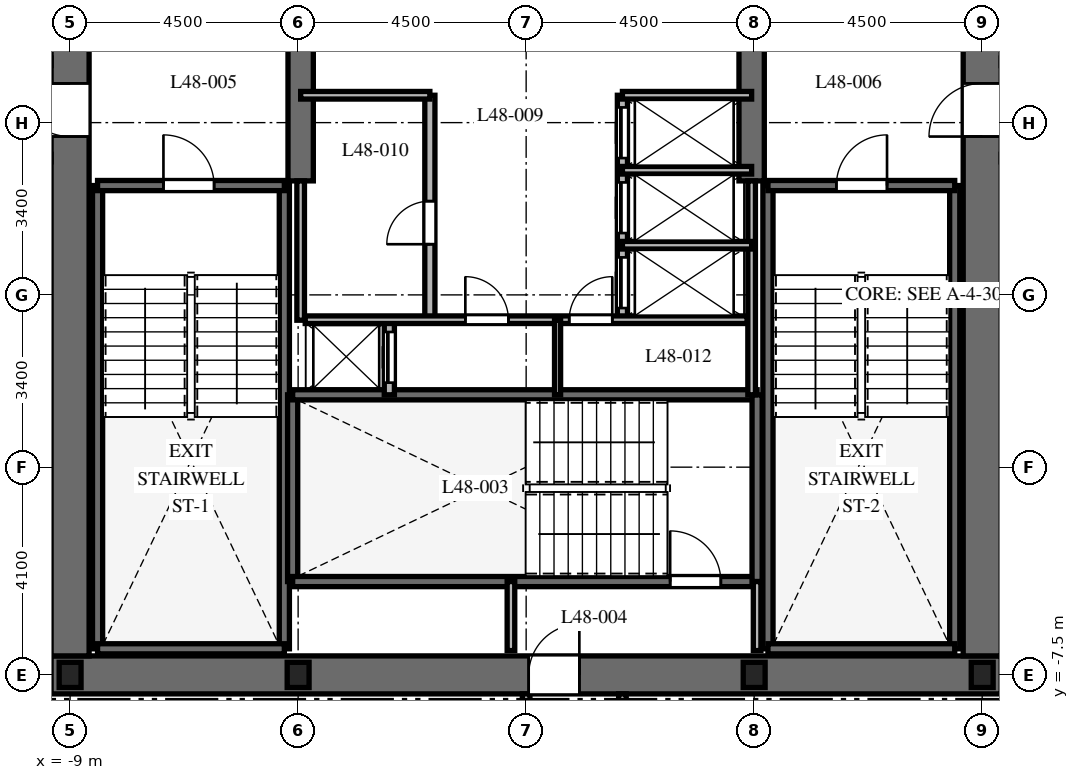
"""IFC4 building model, lengths in metres.
Left out: names, types, materials, properties, quantities, classifications, styles, units other than length and angle.
Written with IfcOpenShell. Run it as: python <this file> out.ifc"""

import sys

from ifc_helpers import new_model, si_unit, direction, frame, frame_2d, origin, origin_2d, place, context, subcontext, project, spatial, rectangle, i_section, extrude, element, fill, save


model = new_model("IFC4")
c1 = context("Model", 3, precision=1e-05, world=origin(), true_north=direction((0.0, 1.0)))
c2 = subcontext(c1, "Body", "Model", "MODEL_VIEW")
j1 = project(units=[si_unit("LENGTHUNIT", "METRE"), si_unit("PLANEANGLEUNIT", "RADIAN")], contexts=[c1])
p1 = place(None, origin())
s1 = spatial("IfcSite", under=j1, at=p1, CompositionType="ELEMENT")
p2 = place(p1, origin())
s2 = spatial("IfcBuilding", under=s1, at=p2, CompositionType="ELEMENT")
p3 = place(p2, frame((0.0, 0.0, 194.1)))
s3 = spatial("IfcBuildingStorey", under=s2, at=p3, CompositionType="ELEMENT", Elevation=194.1)
p4 = place(p3, frame((-9.375, -7.5, 0.0), z_axis=(0.0, 0.0, 1.0), x_axis=(1.0, 0.0, 0.0)))
e1 = element("IfcWall", 1, at=p4, inside=s3, PredefinedType="SHEAR", context=c2, shape_type="SweptSolid", body=[
    extrude(rectangle(XDim=18.75, YDim=0.75, at=frame_2d((9.375, 0.0))), origin(), (0.0, 0.0, 1.0), 3.7),
])
p5 = place(p4, frame((9.425, 0.0, 0.0)))
e2 = element("IfcOpeningElement", 2, at=p5, cuts=e1, PredefinedType="OPENING", context=c2, shape_type="SweptSolid", body=[
    extrude(rectangle(XDim=1.0, YDim=2.15, at=frame_2d((0.5, 1.075))), frame((0.0, 0.385, 0.0), z_axis=(0.0, -1.0, 0.0), x_axis=(1.0, 0.0, 0.0)), (0.0, 0.0, 1.0), 0.77),
])
p6 = place(p3, frame((-9.0, -7.125, 0.0), z_axis=(0.0, 0.0, 1.0), x_axis=(0.0, 1.0, 0.0)))
e3 = element("IfcWall", 3, at=p6, inside=s3, PredefinedType="SHEAR", context=c2, shape_type="SweptSolid", body=[
    extrude(rectangle(XDim=14.25, YDim=0.75, at=frame_2d((7.125, 0.0))), origin(), (0.0, 0.0, 1.0), 3.7),
])
p7 = place(p6, frame((10.25, 0.0, 0.0)))
e4 = element("IfcOpeningElement", 4, at=p7, cuts=e3, PredefinedType="OPENING", context=c2, shape_type="SweptSolid", body=[
    extrude(rectangle(XDim=1.05, YDim=2.15, at=frame_2d((0.525, 1.075))), frame((0.0, 0.385, 0.0), z_axis=(0.0, -1.0, 0.0), x_axis=(1.0, 0.0, 0.0)), (0.0, 0.0, 1.0), 0.77),
])
p8 = place(p3, frame((9.0, -7.125, 0.0), z_axis=(0.0, 0.0, 1.0), x_axis=(0.0, 1.0, 0.0)))
e5 = element("IfcWall", 5, at=p8, inside=s3, PredefinedType="SHEAR", context=c2, shape_type="SweptSolid", body=[
    extrude(rectangle(XDim=14.25, YDim=0.75, at=frame_2d((7.125, 0.0))), origin(), (0.0, 0.0, 1.0), 3.7),
])
p9 = place(p8, frame((10.25, 0.0, 0.0)))
e6 = element("IfcOpeningElement", 6, at=p9, cuts=e5, PredefinedType="OPENING", context=c2, shape_type="SweptSolid", body=[
    extrude(rectangle(XDim=1.05, YDim=2.15, at=frame_2d((0.525, 1.075))), frame((0.0, 0.385, 0.0), z_axis=(0.0, -1.0, 0.0), x_axis=(1.0, 0.0, 0.0)), (0.0, 0.0, 1.0), 0.77),
])
for number, where, z_axis, x_axis in (
    (7, (-4.45, 2.25, 0.0), (0.0, 0.0, 1.0), (0.0, 1.0, 0.0)),
    (8, (4.45, 2.25, 0.0), (0.0, 0.0, 1.0), (0.0, 1.0, 0.0)),
):
    element("IfcWall", number, at=place(p3, frame(where, z_axis=z_axis, x_axis=x_axis)), inside=s3, PredefinedType="SHEAR", context=c2, shape_type="SweptSolid", body=[
        extrude(rectangle(XDim=4.875, YDim=0.5, at=frame_2d((2.438, 0.0))), origin(), (0.0, 0.0, 1.0), 3.7),
    ])
for number, where, z_axis, x_axis in (
    (9, (-8.458, -6.985, 0.0), (0.0, 0.0, 1.0), (0.0, 1.0, 0.0)),
    (10, (-4.772, -6.985, 0.0), (0.0, 0.0, 1.0), (0.0, 1.0, 0.0)),
):
    element("IfcWall", number, at=place(p3, frame(where, z_axis=z_axis, x_axis=x_axis)), inside=s3, PredefinedType="SHEAR", context=c2, shape_type="SweptSolid", body=[
        extrude(rectangle(XDim=9.143, YDim=0.2, at=frame_2d((4.572, 0.0))), origin(), (0.0, 0.0, 1.0), 3.7),
    ])
p10 = place(p3, frame((-8.458, -6.985, 0.0), z_axis=(0.0, 0.0, 1.0), x_axis=(1.0, 0.0, 0.0)))
e11 = element("IfcWall", 11, at=p10, inside=s3, PredefinedType="SHEAR", context=c2, shape_type="SweptSolid", body=[
    extrude(rectangle(XDim=3.686, YDim=0.2, at=frame_2d((1.843, 0.0))), origin(), (0.0, 0.0, 1.0), 3.7),
])
p11 = place(p3, frame((-8.458, 2.158, 0.0), z_axis=(0.0, 0.0, 1.0), x_axis=(1.0, 0.0, 0.0)))
e12 = element("IfcWall", 12, at=p11, inside=s3, PredefinedType="SHEAR", context=c2, shape_type="SweptSolid", body=[
    extrude(rectangle(XDim=3.686, YDim=0.2, at=frame_2d((1.843, 0.0))), origin(), (0.0, 0.0, 1.0), 3.7),
])
p12 = place(p11, frame((1.3, 0.0, 0.0)))
e13 = element("IfcOpeningElement", 13, at=p12, cuts=e12, PredefinedType="OPENING", context=c2, shape_type="SweptSolid", body=[
    extrude(rectangle(XDim=1.0, YDim=2.15, at=frame_2d((0.5, 1.075))), frame((0.0, 0.11, 0.0), z_axis=(0.0, -1.0, 0.0), x_axis=(1.0, 0.0, 0.0)), (0.0, 0.0, 1.0), 0.22),
])
for number, where, z_axis, x_axis in (
    (14, (4.772, -6.985, 0.0), (0.0, 0.0, 1.0), (0.0, 1.0, 0.0)),
    (15, (8.458, -6.985, 0.0), (0.0, 0.0, 1.0), (0.0, 1.0, 0.0)),
):
    element("IfcWall", number, at=place(p3, frame(where, z_axis=z_axis, x_axis=x_axis)), inside=s3, PredefinedType="SHEAR", context=c2, shape_type="SweptSolid", body=[
        extrude(rectangle(XDim=9.143, YDim=0.2, at=frame_2d((4.572, 0.0))), origin(), (0.0, 0.0, 1.0), 3.7),
    ])
p13 = place(p3, frame((4.772, -6.985, 0.0), z_axis=(0.0, 0.0, 1.0), x_axis=(1.0, 0.0, 0.0)))
e16 = element("IfcWall", 16, at=p13, inside=s3, PredefinedType="SHEAR", context=c2, shape_type="SweptSolid", body=[
    extrude(rectangle(XDim=3.686, YDim=0.2, at=frame_2d((1.843, 0.0))), origin(), (0.0, 0.0, 1.0), 3.7),
])
p14 = place(p3, frame((4.772, 2.158, 0.0), z_axis=(0.0, 0.0, 1.0), x_axis=(1.0, 0.0, 0.0)))
e17 = element("IfcWall", 17, at=p14, inside=s3, PredefinedType="SHEAR", context=c2, shape_type="SweptSolid", body=[
    extrude(rectangle(XDim=3.686, YDim=0.2, at=frame_2d((1.843, 0.0))), origin(), (0.0, 0.0, 1.0), 3.7),
])
p15 = place(p14, frame((1.35, 0.0, 0.0)))
e18 = element("IfcOpeningElement", 18, at=p15, cuts=e17, PredefinedType="OPENING", context=c2, shape_type="SweptSolid", body=[
    extrude(rectangle(XDim=1.0, YDim=2.15, at=frame_2d((0.5, 1.075))), frame((0.0, 0.11, 0.0), z_axis=(0.0, -1.0, 0.0), x_axis=(1.0, 0.0, 0.0)), (0.0, 0.0, 1.0), 0.22),
])
p16 = place(p3, frame((-4.608, -5.658, 0.0), z_axis=(0.0, 0.0, 1.0), x_axis=(0.0, 1.0, 0.0)))
e19 = element("IfcWall", 19, at=p16, inside=s3, PredefinedType="SHEAR", context=c2, shape_type="SweptSolid", body=[
    extrude(rectangle(XDim=3.686, YDim=0.2, at=frame_2d((1.843, 0.0))), origin(), (0.0, 0.0, 1.0), 3.7),
])
p17 = place(p3, frame((-4.608, -5.658, 0.0), z_axis=(0.0, 0.0, 1.0), x_axis=(1.0, 0.0, 0.0)))
e20 = element("IfcWall", 20, at=p17, inside=s3, PredefinedType="SHEAR", context=c2, shape_type="SweptSolid", body=[
    extrude(rectangle(XDim=9.166, YDim=0.2, at=frame_2d((4.583, 0.0))), origin(), (0.0, 0.0, 1.0), 3.7),
])
p18 = place(p17, frame((7.45, 0.0, 0.0)))
e21 = element("IfcOpeningElement", 21, at=p18, cuts=e20, PredefinedType="OPENING", context=c2, shape_type="SweptSolid", body=[
    extrude(rectangle(XDim=1.0, YDim=2.15, at=frame_2d((0.5, 1.075))), frame((0.0, 0.11, 0.0), z_axis=(0.0, -1.0, 0.0), x_axis=(1.0, 0.0, 0.0)), (0.0, 0.0, 1.0), 0.22),
])
p19 = place(p3, frame((-4.608, -1.972, 0.0), z_axis=(0.0, 0.0, 1.0), x_axis=(1.0, 0.0, 0.0)))
e22 = element("IfcWall", 22, at=p19, inside=s3, PredefinedType="SHEAR", context=c2, shape_type="SweptSolid", body=[
    extrude(rectangle(XDim=9.166, YDim=0.2, at=frame_2d((4.583, 0.0))), origin(), (0.0, 0.0, 1.0), 3.7),
])
p20 = place(p3, frame((4.558, -5.658, 0.0), z_axis=(0.0, 0.0, 1.0), x_axis=(0.0, 1.0, 0.0)))
e23 = element("IfcWall", 23, at=p20, inside=s3, PredefinedType="SHEAR", context=c2, shape_type="SweptSolid", body=[
    extrude(rectangle(XDim=3.686, YDim=0.2, at=frame_2d((1.843, 0.0))), origin(), (0.0, 0.0, 1.0), 3.7),
])
for number, where, z_axis, x_axis in (
    (24, (-9.0, -7.5, 0.0), (0.0, 0.0, 1.0), (1.0, 0.0, 0.0)),
    (25, (-4.5, -7.5, 0.0), (0.0, 0.0, 1.0), (1.0, 0.0, 0.0)),
    (26, (4.5, -7.5, 0.0), (0.0, 0.0, 1.0), (1.0, 0.0, 0.0)),
    (27, (9.0, -7.5, 0.0), (0.0, 0.0, 1.0), (1.0, 0.0, 0.0)),
):
    element("IfcColumn", number, at=place(p3, frame(where, z_axis=z_axis, x_axis=x_axis)), inside=s3, PredefinedType="COLUMN", context=c2, shape_type="SweptSolid", body=[
        extrude(i_section(OverallWidth=0.432, OverallDepth=0.498, WebThickness=0.056, FlangeThickness=0.089, at=origin_2d()), origin(), (0.0, 0.0, 1.0), 3.7),
    ])
for number, where, z_axis, x_axis in (
    (28, (-0.3, -7.02, 0.0), (0.0, 0.0, 1.0), (0.0, 1.0, 0.0)),
    (29, (4.558, -7.02, 0.0), (0.0, 0.0, 1.0), (0.0, 1.0, 0.0)),
):
    element("IfcWall", number, at=place(p3, frame(where, z_axis=z_axis, x_axis=x_axis)), inside=s3, PredefinedType="PARTITIONING", context=c2, shape_type="SweptSolid", body=[
        extrude(rectangle(XDim=1.362, YDim=0.15, at=frame_2d((0.681, 0.0))), origin(), (0.0, 0.0, 1.0), 3.4),
    ])
p21 = place(p3, frame((-2.7, -1.972, 0.0), z_axis=(0.0, 0.0, 1.0), x_axis=(0.0, 1.0, 0.0)))
e30 = element("IfcWall", 30, at=p21, inside=s3, PredefinedType="PARTITIONING", context=c2, shape_type="SweptSolid", body=[
    extrude(rectangle(XDim=1.472, YDim=0.2, at=frame_2d((0.736, 0.0))), origin(), (0.0, 0.0, 1.0), 3.4),
])
p22 = place(p21, frame((0.24, 0.0, 0.0)))
e31 = element("IfcOpeningElement", 31, at=p22, cuts=e30, PredefinedType="OPENING", context=c2, shape_type="SweptSolid", body=[
    extrude(rectangle(XDim=1.0, YDim=2.2, at=frame_2d((0.5, 1.1))), frame((0.0, 0.11, 0.0), z_axis=(0.0, -1.0, 0.0), x_axis=(1.0, 0.0, 0.0)), (0.0, 0.0, 1.0), 0.22),
])
p23 = place(p3, frame((-4.45, -0.5, 0.0), z_axis=(0.0, 0.0, 1.0), x_axis=(0.0, 1.0, 0.0)))
e32 = element("IfcWall", 32, at=p23, inside=s3, PredefinedType="PARTITIONING", context=c2, shape_type="SweptSolid", body=[
    extrude(rectangle(XDim=2.75, YDim=0.15, at=frame_2d((1.375, 0.0))), origin(), (0.0, 0.0, 1.0), 3.4),
])
p24 = place(p3, frame((4.45, -1.972, 0.0), z_axis=(0.0, 0.0, 1.0), x_axis=(0.0, 1.0, 0.0)))
e33 = element("IfcWall", 33, at=p24, inside=s3, PredefinedType="PARTITIONING", context=c2, shape_type="SweptSolid", body=[
    extrude(rectangle(XDim=4.222, YDim=0.15, at=frame_2d((2.111, 0.0))), origin(), (0.0, 0.0, 1.0), 3.4),
])
p25 = place(p3, frame((-1.9, -0.5, 0.0), z_axis=(0.0, 0.0, 1.0), x_axis=(0.0, 1.0, 0.0)))
e34 = element("IfcWall", 34, at=p25, inside=s3, PredefinedType="PARTITIONING", context=c2, shape_type="SweptSolid", body=[
    extrude(rectangle(XDim=4.44, YDim=0.2, at=frame_2d((2.22, 0.0))), origin(), (0.0, 0.0, 1.0), 3.4),
])
p26 = place(p25, frame((1.5, 0.0, 0.0)))
e35 = element("IfcOpeningElement", 35, at=p26, cuts=e34, PredefinedType="OPENING", context=c2, shape_type="SweptSolid", body=[
    extrude(rectangle(XDim=0.85, YDim=2.03, at=frame_2d((0.425, 1.015))), frame((0.0, 0.11, 0.0), z_axis=(0.0, -1.0, 0.0), x_axis=(1.0, 0.0, 0.0)), (0.0, 0.0, 1.0), 0.22),
])
p27 = place(p3, frame((-4.45, 3.94, 0.0), z_axis=(0.0, 0.0, 1.0), x_axis=(1.0, 0.0, 0.0)))
e36 = element("IfcWall", 36, at=p27, inside=s3, PredefinedType="PARTITIONING", context=c2, shape_type="SweptSolid", body=[
    extrude(rectangle(XDim=2.55, YDim=0.15, at=frame_2d((1.275, 0.0))), origin(), (0.0, 0.0, 1.0), 3.4),
])
p28 = place(p3, frame((1.9, -0.5, 0.0), z_axis=(0.0, 0.0, 1.0), x_axis=(0.0, 1.0, 0.0)))
e37 = element("IfcWall", 37, at=p28, inside=s3, PredefinedType="PARTITIONING", context=c2, shape_type="SweptSolid", body=[
    extrude(rectangle(XDim=4.44, YDim=0.2, at=frame_2d((2.22, 0.0))), origin(), (0.0, 0.0, 1.0), 3.4),
])
p29 = place(p28, frame((0.24, 0.0, 0.0)))
e38 = element("IfcOpeningElement", 38, at=p29, cuts=e37, PredefinedType="OPENING", context=c2, shape_type="SweptSolid", body=[
    extrude(rectangle(XDim=1.0, YDim=2.2, at=frame_2d((0.5, 1.1))), frame((0.0, 0.11, 0.0), z_axis=(0.0, -1.0, 0.0), x_axis=(1.0, 0.0, 0.0)), (0.0, 0.0, 1.0), 0.22),
])
p30 = place(p28, frame((1.72, 0.0, 0.0)))
e39 = element("IfcOpeningElement", 39, at=p30, cuts=e37, PredefinedType="OPENING", context=c2, shape_type="SweptSolid", body=[
    extrude(rectangle(XDim=1.0, YDim=2.2, at=frame_2d((0.5, 1.1))), frame((0.0, 0.11, 0.0), z_axis=(0.0, -1.0, 0.0), x_axis=(1.0, 0.0, 0.0)), (0.0, 0.0, 1.0), 0.22),
])
p31 = place(p28, frame((3.2, 0.0, 0.0)))
e40 = element("IfcOpeningElement", 40, at=p31, cuts=e37, PredefinedType="OPENING", context=c2, shape_type="SweptSolid", body=[
    extrude(rectangle(XDim=1.0, YDim=2.2, at=frame_2d((0.5, 1.1))), frame((0.0, 0.11, 0.0), z_axis=(0.0, -1.0, 0.0), x_axis=(1.0, 0.0, 0.0)), (0.0, 0.0, 1.0), 0.22),
])
for number, where, z_axis, x_axis in (
    (41, (1.9, 3.94, 0.0), (0.0, 0.0, 1.0), (1.0, 0.0, 0.0)),
    (42, (1.9, 0.98, 0.0), (0.0, 0.0, 1.0), (1.0, 0.0, 0.0)),
    (43, (1.9, 2.46, 0.0), (0.0, 0.0, 1.0), (1.0, 0.0, 0.0)),
):
    element("IfcWall", number, at=place(p3, frame(where, z_axis=z_axis, x_axis=x_axis)), inside=s3, PredefinedType="PARTITIONING", context=c2, shape_type="SweptSolid", body=[
        extrude(rectangle(XDim=2.55, YDim=0.15, at=frame_2d((1.275, 0.0))), origin(), (0.0, 0.0, 1.0), 3.4),
    ])
p32 = place(p3, frame((-4.36, -0.49, 0.0), z_axis=(0.0, 0.0, 1.0), x_axis=(1.0, 0.0, 0.0)))
e44 = element("IfcWall", 44, at=p32, inside=s3, PredefinedType="PARTITIONING", context=c2, shape_type="SweptSolid", body=[
    extrude(rectangle(XDim=8.72, YDim=0.15, at=frame_2d((4.36, 0.0))), origin(), (0.0, 0.0, 1.0), 3.4),
])
p33 = place(p32, frame((3.16, 0.0, 0.0)))
e45 = element("IfcOpeningElement", 45, at=p33, cuts=e44, PredefinedType="OPENING", context=c2, shape_type="SweptSolid", body=[
    extrude(rectangle(XDim=0.85, YDim=2.03, at=frame_2d((0.425, 1.015))), frame((0.0, 0.085, 0.0), z_axis=(0.0, -1.0, 0.0), x_axis=(1.0, 0.0, 0.0)), (0.0, 0.0, 1.0), 0.17),
])
p34 = place(p32, frame((5.21, 0.0, 0.0)))
e46 = element("IfcOpeningElement", 46, at=p34, cuts=e44, PredefinedType="OPENING", context=c2, shape_type="SweptSolid", body=[
    extrude(rectangle(XDim=0.85, YDim=2.03, at=frame_2d((0.425, 1.015))), frame((0.0, 0.085, 0.0), z_axis=(0.0, -1.0, 0.0), x_axis=(1.0, 0.0, 0.0)), (0.0, 0.0, 1.0), 0.17),
])
p35 = place(p3, frame((0.62, -1.972, 0.0), z_axis=(0.0, 0.0, 1.0), x_axis=(0.0, 1.0, 0.0)))
e47 = element("IfcWall", 47, at=p35, inside=s3, PredefinedType="PARTITIONING", context=c2, shape_type="SweptSolid", body=[
    extrude(rectangle(XDim=1.472, YDim=0.12, at=frame_2d((0.736, 0.0))), origin(), (0.0, 0.0, 1.0), 3.4),
])
for number, where, z_axis, x_axis in (
    (48, (0.0, -10.05, 0.0), (0.0, 0.0, 1.0), (0.0, 1.0, 0.0)),
    (49, (1.9, -7.875, 0.0), (0.0, 0.0, 1.0), (0.0, -1.0, 0.0)),
):
    element("IfcWall", number, at=place(p3, frame(where, z_axis=z_axis, x_axis=x_axis)), inside=s3, PredefinedType="PARTITIONING", context=c2, shape_type="SweptSolid", body=[
        extrude(rectangle(XDim=2.175, YDim=0.15, at=frame_2d((1.087, 0.0))), origin(), (0.0, 0.0, 1.0), 3.4),
    ])
p36 = place(p12, origin())
e50 = element("IfcDoor", 50, at=p36, inside=s3, OperationType="SINGLE_SWING_LEFT", PredefinedType="DOOR", context=c2, shape_type="SweptSolid", body=[
    extrude(rectangle(XDim=1.0, YDim=2.15, at=frame_2d((0.5, 1.075))), frame((0.0, 0.025, 0.0), z_axis=(0.0, -1.0, 0.0), x_axis=(1.0, 0.0, 0.0)), (0.0, 0.0, 1.0), 0.05),
])
fill(e13, e50)
p37 = place(p15, origin())
e51 = element("IfcDoor", 51, at=p37, inside=s3, OperationType="SINGLE_SWING_RIGHT", PredefinedType="DOOR", context=c2, shape_type="SweptSolid", body=[
    extrude(rectangle(XDim=1.0, YDim=2.15, at=frame_2d((0.5, 1.075))), frame((0.0, 0.025, 0.0), z_axis=(0.0, -1.0, 0.0), x_axis=(1.0, 0.0, 0.0)), (0.0, 0.0, 1.0), 0.05),
])
fill(e18, e51)
p38 = place(p18, origin())
e52 = element("IfcDoor", 52, at=p38, inside=s3, OperationType="SINGLE_SWING_LEFT", PredefinedType="DOOR", context=c2, shape_type="SweptSolid", body=[
    extrude(rectangle(XDim=1.0, YDim=2.15, at=frame_2d((0.5, 1.075))), frame((0.0, 0.025, 0.0), z_axis=(0.0, -1.0, 0.0), x_axis=(1.0, 0.0, 0.0)), (0.0, 0.0, 1.0), 0.05),
])
fill(e21, e52)
p39 = place(p5, origin())
e53 = element("IfcDoor", 53, at=p39, inside=s3, OperationType="SINGLE_SWING_RIGHT", PredefinedType="DOOR", context=c2, shape_type="SweptSolid", body=[
    extrude(rectangle(XDim=1.0, YDim=2.15, at=frame_2d((0.5, 1.075))), frame((0.0, 0.025, 0.0), z_axis=(0.0, -1.0, 0.0), x_axis=(1.0, 0.0, 0.0)), (0.0, 0.0, 1.0), 0.05),
])
fill(e2, e53)
p40 = place(p7, origin())
e54 = element("IfcDoor", 54, at=p40, inside=s3, OperationType="SINGLE_SWING_RIGHT", PredefinedType="DOOR", context=c2, shape_type="SweptSolid", body=[
    extrude(rectangle(XDim=1.05, YDim=2.15, at=frame_2d((0.525, 1.075))), frame((0.0, 0.025, 0.0), z_axis=(0.0, -1.0, 0.0), x_axis=(1.0, 0.0, 0.0)), (0.0, 0.0, 1.0), 0.05),
])
fill(e4, e54)
p41 = place(p9, origin())
e55 = element("IfcDoor", 55, at=p41, inside=s3, OperationType="SINGLE_SWING_LEFT", PredefinedType="DOOR", context=c2, shape_type="SweptSolid", body=[
    extrude(rectangle(XDim=1.05, YDim=2.15, at=frame_2d((0.525, 1.075))), frame((0.0, 0.025, 0.0), z_axis=(0.0, -1.0, 0.0), x_axis=(1.0, 0.0, 0.0)), (0.0, 0.0, 1.0), 0.05),
])
fill(e6, e55)
p42 = place(p22, origin())
e56 = element("IfcDoor", 56, at=p42, inside=s3, OperationType="SLIDING_TO_LEFT", PredefinedType="DOOR", context=c2, shape_type="SweptSolid", body=[
    extrude(rectangle(XDim=1.0, YDim=2.2, at=frame_2d((0.5, 1.1))), frame((0.0, 0.025, 0.0), z_axis=(0.0, -1.0, 0.0), x_axis=(1.0, 0.0, 0.0)), (0.0, 0.0, 1.0), 0.05),
])
fill(e31, e56)
p43 = place(p26, origin())
e57 = element("IfcDoor", 57, at=p43, inside=s3, OperationType="SINGLE_SWING_LEFT", PredefinedType="DOOR", context=c2, shape_type="SweptSolid", body=[
    extrude(rectangle(XDim=0.85, YDim=2.03, at=frame_2d((0.425, 1.015))), frame((0.0, 0.025, 0.0), z_axis=(0.0, -1.0, 0.0), x_axis=(1.0, 0.0, 0.0)), (0.0, 0.0, 1.0), 0.05),
])
fill(e35, e57)
p44 = place(p29, origin())
e58 = element("IfcDoor", 58, at=p44, inside=s3, OperationType="SLIDING_TO_RIGHT", PredefinedType="DOOR", context=c2, shape_type="SweptSolid", body=[
    extrude(rectangle(XDim=1.0, YDim=2.2, at=frame_2d((0.5, 1.1))), frame((0.0, 0.025, 0.0), z_axis=(0.0, -1.0, 0.0), x_axis=(1.0, 0.0, 0.0)), (0.0, 0.0, 1.0), 0.05),
])
fill(e38, e58)
p45 = place(p30, origin())
e59 = element("IfcDoor", 59, at=p45, inside=s3, OperationType="SLIDING_TO_RIGHT", PredefinedType="DOOR", context=c2, shape_type="SweptSolid", body=[
    extrude(rectangle(XDim=1.0, YDim=2.2, at=frame_2d((0.5, 1.1))), frame((0.0, 0.025, 0.0), z_axis=(0.0, -1.0, 0.0), x_axis=(1.0, 0.0, 0.0)), (0.0, 0.0, 1.0), 0.05),
])
fill(e39, e59)
p46 = place(p31, origin())
e60 = element("IfcDoor", 60, at=p46, inside=s3, OperationType="SLIDING_TO_RIGHT", PredefinedType="DOOR", context=c2, shape_type="SweptSolid", body=[
    extrude(rectangle(XDim=1.0, YDim=2.2, at=frame_2d((0.5, 1.1))), frame((0.0, 0.025, 0.0), z_axis=(0.0, -1.0, 0.0), x_axis=(1.0, 0.0, 0.0)), (0.0, 0.0, 1.0), 0.05),
])
fill(e40, e60)
p47 = place(p33, origin())
e61 = element("IfcDoor", 61, at=p47, inside=s3, OperationType="SINGLE_SWING_LEFT", PredefinedType="DOOR", context=c2, shape_type="SweptSolid", body=[
    extrude(rectangle(XDim=0.85, YDim=2.03, at=frame_2d((0.425, 1.015))), frame((0.0, 0.025, 0.0), z_axis=(0.0, -1.0, 0.0), x_axis=(1.0, 0.0, 0.0)), (0.0, 0.0, 1.0), 0.05),
])
fill(e45, e61)
p48 = place(p34, origin())
e62 = element("IfcDoor", 62, at=p48, inside=s3, OperationType="SINGLE_SWING_RIGHT", PredefinedType="DOOR", context=c2, shape_type="SweptSolid", body=[
    extrude(rectangle(XDim=0.85, YDim=2.03, at=frame_2d((0.425, 1.015))), frame((0.0, 0.025, 0.0), z_axis=(0.0, -1.0, 0.0), x_axis=(1.0, 0.0, 0.0)), (0.0, 0.0, 1.0), 0.05),
])
fill(e46, e62)
save(model, sys.argv[1])
